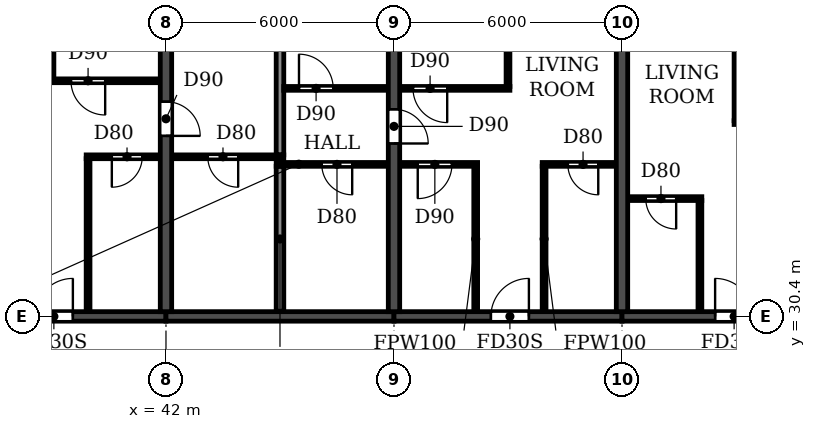
"""IFC4 building model, lengths in metres.
Left out: names, types, materials, properties, quantities, classifications, styles, units other than length and angle.
Written with IfcOpenShell. Run it as: python <this file> out.ifc"""

import sys

from ifc_helpers import new_model, si_unit, direction, frame, frame_2d, origin, place, context, subcontext, project, spatial, rectangle, extrude, element, fill, save


model = new_model("IFC4")
c1 = context("Model", 3, precision=1e-05, world=origin(), true_north=direction((0.0, 1.0)))
c2 = subcontext(c1, "Body", "Model", "MODEL_VIEW")
j1 = project(units=[si_unit("LENGTHUNIT", "METRE"), si_unit("PLANEANGLEUNIT", "RADIAN")], contexts=[c1])
p1 = place(None, origin())
s1 = spatial("IfcSite", under=j1, at=p1, CompositionType="ELEMENT")
p2 = place(p1, origin())
s2 = spatial("IfcBuilding", under=s1, at=p2, CompositionType="ELEMENT")
p3 = place(p2, frame((0.0, 0.0, 142.2)))
s3 = spatial("IfcBuildingStorey", under=s2, at=p3, CompositionType="ELEMENT", Elevation=142.2)
p4 = place(p3, frame((42.0, 30.525, 0.0), z_axis=(0.0, 0.0, 1.0), x_axis=(0.0, 1.0, 0.0)))
e1 = element("IfcWall", 1, at=p4, inside=s3, PredefinedType="SHEAR", context=c2, shape_type="SweptSolid", body=[
    extrude(rectangle(XDim=11.675, YDim=0.3, at=frame_2d((5.837, 0.0))), origin(), (0.0, 0.0, 1.0), 3.07),
])
p5 = place(p4, frame((4.625, 0.0, 0.0)))
e2 = element("IfcOpeningElement", 2, at=p5, cuts=e1, PredefinedType="OPENING", context=c2, shape_type="SweptSolid", body=[
    extrude(rectangle(XDim=0.9, YDim=2.1, at=frame_2d((0.45, 1.05))), frame((0.0, 0.16, 0.0), z_axis=(0.0, -1.0, 0.0), x_axis=(1.0, 0.0, 0.0)), (0.0, 0.0, 1.0), 0.32),
])
p6 = place(p3, frame((48.0, 30.525, 0.0), z_axis=(0.0, 0.0, 1.0), x_axis=(0.0, 1.0, 0.0)))
e3 = element("IfcWall", 3, at=p6, inside=s3, PredefinedType="SHEAR", context=c2, shape_type="SweptSolid", body=[
    extrude(rectangle(XDim=11.675, YDim=0.3, at=frame_2d((5.837, 0.0))), origin(), (0.0, 0.0, 1.0), 3.07),
])
p7 = place(p6, frame((4.425, 0.0, 0.0)))
e4 = element("IfcOpeningElement", 4, at=p7, cuts=e3, PredefinedType="OPENING", context=c2, shape_type="SweptSolid", body=[
    extrude(rectangle(XDim=0.9, YDim=2.1, at=frame_2d((0.45, 1.05))), frame((0.0, 0.16, 0.0), z_axis=(0.0, -1.0, 0.0), x_axis=(1.0, 0.0, 0.0)), (0.0, 0.0, 1.0), 0.32),
])
p8 = place(p3, frame((54.0, 30.525, 0.0), z_axis=(0.0, 0.0, 1.0), x_axis=(0.0, 1.0, 0.0)))
e5 = element("IfcWall", 5, at=p8, inside=s3, PredefinedType="SHEAR", context=c2, shape_type="SweptSolid", body=[
    extrude(rectangle(XDim=11.675, YDim=0.3, at=frame_2d((5.837, 0.0))), origin(), (0.0, 0.0, 1.0), 3.07),
])
p9 = place(p3, frame((36.0, 30.4, 0.0), z_axis=(0.0, 0.0, 1.0), x_axis=(1.0, 0.0, 0.0)))
e6 = element("IfcWall", 6, at=p9, inside=s3, PredefinedType="SHEAR", context=c2, shape_type="SweptSolid", body=[
    extrude(rectangle(XDim=6.0, YDim=0.25, at=frame_2d((3.0, 0.0))), origin(), (0.0, 0.0, 1.0), 2.47),
])
p10 = place(p9, frame((2.55, 0.0, 0.0)))
e7 = element("IfcOpeningElement", 7, at=p10, cuts=e6, PredefinedType="OPENING", context=c2, shape_type="SweptSolid", body=[
    extrude(rectangle(XDim=1.0, YDim=2.1, at=frame_2d((0.5, 1.05))), frame((0.0, 0.135, 0.0), z_axis=(0.0, -1.0, 0.0), x_axis=(1.0, 0.0, 0.0)), (0.0, 0.0, 1.0), 0.27),
])
p11 = place(p3, frame((42.0, 30.4, 0.0), z_axis=(0.0, 0.0, 1.0), x_axis=(1.0, 0.0, 0.0)))
e8 = element("IfcWall", 8, at=p11, inside=s3, PredefinedType="SHEAR", context=c2, shape_type="SweptSolid", body=[
    extrude(rectangle(XDim=6.0, YDim=0.25, at=frame_2d((3.0, 0.0))), origin(), (0.0, 0.0, 1.0), 2.47),
])
p12 = place(p3, frame((48.0, 30.4, 0.0), z_axis=(0.0, 0.0, 1.0), x_axis=(1.0, 0.0, 0.0)))
e9 = element("IfcWall", 9, at=p12, inside=s3, PredefinedType="SHEAR", context=c2, shape_type="SweptSolid", body=[
    extrude(rectangle(XDim=6.0, YDim=0.25, at=frame_2d((3.0, 0.0))), origin(), (0.0, 0.0, 1.0), 2.47),
])
p13 = place(p12, frame((2.55, 0.0, 0.0)))
e10 = element("IfcOpeningElement", 10, at=p13, cuts=e9, PredefinedType="OPENING", context=c2, shape_type="SweptSolid", body=[
    extrude(rectangle(XDim=1.0, YDim=2.1, at=frame_2d((0.5, 1.05))), frame((0.0, 0.135, 0.0), z_axis=(0.0, -1.0, 0.0), x_axis=(1.0, 0.0, 0.0)), (0.0, 0.0, 1.0), 0.27),
])
p14 = place(p3, frame((54.0, 30.4, 0.0), z_axis=(0.0, 0.0, 1.0), x_axis=(1.0, 0.0, 0.0)))
e11 = element("IfcWall", 11, at=p14, inside=s3, PredefinedType="SHEAR", context=c2, shape_type="SweptSolid", body=[
    extrude(rectangle(XDim=6.0, YDim=0.25, at=frame_2d((3.0, 0.0))), origin(), (0.0, 0.0, 1.0), 2.47),
])
p15 = place(p14, frame((2.45, 0.0, 0.0)))
e12 = element("IfcOpeningElement", 12, at=p15, cuts=e11, PredefinedType="OPENING", context=c2, shape_type="SweptSolid", body=[
    extrude(rectangle(XDim=1.0, YDim=2.1, at=frame_2d((0.5, 1.05))), frame((0.0, 0.135, 0.0), z_axis=(0.0, -1.0, 0.0), x_axis=(1.0, 0.0, 0.0)), (0.0, 0.0, 1.0), 0.27),
])
p16 = place(p3, frame((45.0, 30.535, 0.0), z_axis=(0.0, 0.0, 1.0), x_axis=(0.0, 1.0, 0.0)))
e13 = element("IfcWall", 13, at=p16, inside=s3, PredefinedType="PARTITIONING", context=c2, shape_type="SweptSolid", body=[
    extrude(rectangle(XDim=3.815, YDim=0.2, at=frame_2d((1.908, 0.0))), origin(), (0.0, 0.0, 1.0), 3.07),
])
p17 = place(p3, frame((45.0, 34.65, 0.0), z_axis=(0.0, 0.0, 1.0), x_axis=(0.0, 1.0, 0.0)))
e14 = element("IfcWall", 14, at=p17, inside=s3, PredefinedType="PARTITIONING", context=c2, shape_type="SweptSolid", body=[
    extrude(rectangle(XDim=7.69, YDim=0.2, at=frame_2d((3.845, 0.0))), origin(), (0.0, 0.0, 1.0), 3.07),
])
p18 = place(p3, frame((54.16, 33.5, 0.0), z_axis=(0.0, 0.0, 1.0), x_axis=(1.0, 0.0, 0.0)))
e15 = element("IfcWall", 15, at=p18, inside=s3, PredefinedType="PARTITIONING", context=c2, shape_type="SweptSolid", body=[
    extrude(rectangle(XDim=1.94, YDim=0.1, at=frame_2d((0.97, 0.0))), origin(), (0.0, 0.0, 1.0), 3.07),
])
p19 = place(p18, frame((0.465, 0.0, 0.0)))
e16 = element("IfcOpeningElement", 16, at=p19, cuts=e15, PredefinedType="OPENING", context=c2, shape_type="SweptSolid", body=[
    extrude(rectangle(XDim=0.8, YDim=2.1, at=frame_2d((0.4, 1.05))), frame((0.0, 0.06, 0.0), z_axis=(0.0, -1.0, 0.0), x_axis=(1.0, 0.0, 0.0)), (0.0, 0.0, 1.0), 0.12),
])
p20 = place(p3, frame((44.9, 34.4, 0.0), z_axis=(0.0, 0.0, 1.0), x_axis=(1.0, 0.0, 0.0)))
e17 = element("IfcWall", 17, at=p20, inside=s3, PredefinedType="PARTITIONING", context=c2, shape_type="SweptSolid", body=[
    extrude(rectangle(XDim=2.94, YDim=0.1, at=frame_2d((1.47, 0.0))), origin(), (0.0, 0.0, 1.0), 3.07),
])
p21 = place(p20, frame((1.2, 0.0, 0.0)))
e18 = element("IfcOpeningElement", 18, at=p21, cuts=e17, PredefinedType="OPENING", context=c2, shape_type="SweptSolid", body=[
    extrude(rectangle(XDim=0.8, YDim=2.1, at=frame_2d((0.4, 1.05))), frame((0.0, 0.06, 0.0), z_axis=(0.0, -1.0, 0.0), x_axis=(1.0, 0.0, 0.0)), (0.0, 0.0, 1.0), 0.12),
])
p22 = place(p3, frame((48.16, 34.4, 0.0), z_axis=(0.0, 0.0, 1.0), x_axis=(1.0, 0.0, 0.0)))
e19 = element("IfcWall", 19, at=p22, inside=s3, PredefinedType="PARTITIONING", context=c2, shape_type="SweptSolid", body=[
    extrude(rectangle(XDim=2.04, YDim=0.1, at=frame_2d((1.02, 0.0))), origin(), (0.0, 0.0, 1.0), 3.07),
])
p23 = place(p22, frame((0.465, 0.0, 0.0)))
e20 = element("IfcOpeningElement", 20, at=p23, cuts=e19, PredefinedType="OPENING", context=c2, shape_type="SweptSolid", body=[
    extrude(rectangle(XDim=0.9, YDim=2.1, at=frame_2d((0.45, 1.05))), frame((0.0, 0.06, 0.0), z_axis=(0.0, -1.0, 0.0), x_axis=(1.0, 0.0, 0.0)), (0.0, 0.0, 1.0), 0.12),
])
p24 = place(p3, frame((51.9, 34.4, 0.0), z_axis=(0.0, 0.0, 1.0), x_axis=(1.0, 0.0, 0.0)))
e21 = element("IfcWall", 21, at=p24, inside=s3, PredefinedType="PARTITIONING", context=c2, shape_type="SweptSolid", body=[
    extrude(rectangle(XDim=1.94, YDim=0.1, at=frame_2d((0.97, 0.0))), origin(), (0.0, 0.0, 1.0), 3.07),
])
p25 = place(p24, frame((0.675, 0.0, 0.0)))
e22 = element("IfcOpeningElement", 22, at=p25, cuts=e21, PredefinedType="OPENING", context=c2, shape_type="SweptSolid", body=[
    extrude(rectangle(XDim=0.8, YDim=2.1, at=frame_2d((0.4, 1.05))), frame((0.0, 0.06, 0.0), z_axis=(0.0, -1.0, 0.0), x_axis=(1.0, 0.0, 0.0)), (0.0, 0.0, 1.0), 0.12),
])
p26 = place(p3, frame((39.9, 34.6, 0.0), z_axis=(0.0, 0.0, 1.0), x_axis=(1.0, 0.0, 0.0)))
e23 = element("IfcWall", 23, at=p26, inside=s3, PredefinedType="PARTITIONING", context=c2, shape_type="SweptSolid", body=[
    extrude(rectangle(XDim=1.94, YDim=0.1, at=frame_2d((0.97, 0.0))), origin(), (0.0, 0.0, 1.0), 3.07),
])
p27 = place(p26, frame((0.675, 0.0, 0.0)))
e24 = element("IfcOpeningElement", 24, at=p27, cuts=e23, PredefinedType="OPENING", context=c2, shape_type="SweptSolid", body=[
    extrude(rectangle(XDim=0.8, YDim=2.1, at=frame_2d((0.4, 1.05))), frame((0.0, 0.06, 0.0), z_axis=(0.0, -1.0, 0.0), x_axis=(1.0, 0.0, 0.0)), (0.0, 0.0, 1.0), 0.12),
])
p28 = place(p3, frame((42.16, 34.6, 0.0), z_axis=(0.0, 0.0, 1.0), x_axis=(1.0, 0.0, 0.0)))
e25 = element("IfcWall", 25, at=p28, inside=s3, PredefinedType="PARTITIONING", context=c2, shape_type="SweptSolid", body=[
    extrude(rectangle(XDim=2.94, YDim=0.1, at=frame_2d((1.47, 0.0))), origin(), (0.0, 0.0, 1.0), 3.07),
])
p29 = place(p28, frame((0.94, 0.0, 0.0)))
e26 = element("IfcOpeningElement", 26, at=p29, cuts=e25, PredefinedType="OPENING", context=c2, shape_type="SweptSolid", body=[
    extrude(rectangle(XDim=0.8, YDim=2.1, at=frame_2d((0.4, 1.05))), frame((0.0, 0.06, 0.0), z_axis=(0.0, -1.0, 0.0), x_axis=(1.0, 0.0, 0.0)), (0.0, 0.0, 1.0), 0.12),
])
p30 = place(p3, frame((56.95, 35.5, 0.0), z_axis=(0.0, 0.0, 1.0), x_axis=(1.0, 0.0, 0.0)))
e27 = element("IfcWall", 27, at=p30, inside=s3, PredefinedType="PARTITIONING", context=c2, shape_type="SweptSolid", body=[
    extrude(rectangle(XDim=2.89, YDim=0.1, at=frame_2d((1.445, 0.0))), origin(), (0.0, 0.0, 1.0), 3.07),
])
p31 = place(p30, frame((0.55, 0.0, 0.0)))
e28 = element("IfcOpeningElement", 28, at=p31, cuts=e27, PredefinedType="OPENING", context=c2, shape_type="SweptSolid", body=[
    extrude(rectangle(XDim=0.9, YDim=2.1, at=frame_2d((0.45, 1.05))), frame((0.0, 0.06, 0.0), z_axis=(0.0, -1.0, 0.0), x_axis=(1.0, 0.0, 0.0)), (0.0, 0.0, 1.0), 0.12),
])
p32 = place(p3, frame((45.1, 36.4, 0.0), z_axis=(0.0, 0.0, 1.0), x_axis=(1.0, 0.0, 0.0)))
e29 = element("IfcWall", 29, at=p32, inside=s3, PredefinedType="PARTITIONING", context=c2, shape_type="SweptSolid", body=[
    extrude(rectangle(XDim=2.74, YDim=0.1, at=frame_2d((1.37, 0.0))), origin(), (0.0, 0.0, 1.0), 3.07),
])
p33 = place(p32, frame((0.4, 0.0, 0.0)))
e30 = element("IfcOpeningElement", 30, at=p33, cuts=e29, PredefinedType="OPENING", context=c2, shape_type="SweptSolid", body=[
    extrude(rectangle(XDim=0.9, YDim=2.1, at=frame_2d((0.45, 1.05))), frame((0.0, 0.06, 0.0), z_axis=(0.0, -1.0, 0.0), x_axis=(1.0, 0.0, 0.0)), (0.0, 0.0, 1.0), 0.12),
])
p34 = place(p3, frame((48.16, 36.4, 0.0), z_axis=(0.0, 0.0, 1.0), x_axis=(1.0, 0.0, 0.0)))
e31 = element("IfcWall", 31, at=p34, inside=s3, PredefinedType="PARTITIONING", context=c2, shape_type="SweptSolid", body=[
    extrude(rectangle(XDim=2.89, YDim=0.1, at=frame_2d((1.445, 0.0))), origin(), (0.0, 0.0, 1.0), 3.07),
])
p35 = place(p34, frame((0.34, 0.0, 0.0)))
e32 = element("IfcOpeningElement", 32, at=p35, cuts=e31, PredefinedType="OPENING", context=c2, shape_type="SweptSolid", body=[
    extrude(rectangle(XDim=0.9, YDim=2.1, at=frame_2d((0.45, 1.05))), frame((0.0, 0.06, 0.0), z_axis=(0.0, -1.0, 0.0), x_axis=(1.0, 0.0, 0.0)), (0.0, 0.0, 1.0), 0.12),
])
p36 = place(p3, frame((38.95, 36.6, 0.0), z_axis=(0.0, 0.0, 1.0), x_axis=(1.0, 0.0, 0.0)))
e33 = element("IfcWall", 33, at=p36, inside=s3, PredefinedType="PARTITIONING", context=c2, shape_type="SweptSolid", body=[
    extrude(rectangle(XDim=2.89, YDim=0.1, at=frame_2d((1.445, 0.0))), origin(), (0.0, 0.0, 1.0), 3.07),
])
p37 = place(p36, frame((0.55, 0.0, 0.0)))
e34 = element("IfcOpeningElement", 34, at=p37, cuts=e33, PredefinedType="OPENING", context=c2, shape_type="SweptSolid", body=[
    extrude(rectangle(XDim=0.9, YDim=2.1, at=frame_2d((0.45, 1.05))), frame((0.0, 0.06, 0.0), z_axis=(0.0, -1.0, 0.0), x_axis=(1.0, 0.0, 0.0)), (0.0, 0.0, 1.0), 0.12),
])
p38 = place(p3, frame((39.0, 36.65, 0.0), z_axis=(0.0, 0.0, 1.0), x_axis=(0.0, 1.0, 0.0)))
e35 = element("IfcWall", 35, at=p38, inside=s3, PredefinedType="PARTITIONING", context=c2, shape_type="SweptSolid", body=[
    extrude(rectangle(XDim=5.69, YDim=0.1, at=frame_2d((2.845, 0.0))), origin(), (0.0, 0.0, 1.0), 3.07),
])
p39 = place(p3, frame((39.95, 30.535, 0.0), z_axis=(0.0, 0.0, 1.0), x_axis=(0.0, 1.0, 0.0)))
e36 = element("IfcWall", 36, at=p39, inside=s3, PredefinedType="PARTITIONING", context=c2, shape_type="SweptSolid", body=[
    extrude(rectangle(XDim=4.015, YDim=0.1, at=frame_2d((2.008, 0.0))), origin(), (0.0, 0.0, 1.0), 3.07),
])
p40 = place(p3, frame((50.15, 30.535, 0.0), z_axis=(0.0, 0.0, 1.0), x_axis=(0.0, 1.0, 0.0)))
e37 = element("IfcWall", 37, at=p40, inside=s3, PredefinedType="PARTITIONING", context=c2, shape_type="SweptSolid", body=[
    extrude(rectangle(XDim=3.815, YDim=0.1, at=frame_2d((1.908, 0.0))), origin(), (0.0, 0.0, 1.0), 3.07),
])
p41 = place(p3, frame((51.0, 36.45, 0.0), z_axis=(0.0, 0.0, 1.0), x_axis=(0.0, 1.0, 0.0)))
e38 = element("IfcWall", 38, at=p41, inside=s3, PredefinedType="PARTITIONING", context=c2, shape_type="SweptSolid", body=[
    extrude(rectangle(XDim=5.89, YDim=0.1, at=frame_2d((2.945, 0.0))), origin(), (0.0, 0.0, 1.0), 3.07),
])
p42 = place(p3, frame((51.95, 30.535, 0.0), z_axis=(0.0, 0.0, 1.0), x_axis=(0.0, 1.0, 0.0)))
e39 = element("IfcWall", 39, at=p42, inside=s3, PredefinedType="PARTITIONING", context=c2, shape_type="SweptSolid", body=[
    extrude(rectangle(XDim=3.815, YDim=0.1, at=frame_2d((1.908, 0.0))), origin(), (0.0, 0.0, 1.0), 3.07),
])
p43 = place(p3, frame((56.05, 30.535, 0.0), z_axis=(0.0, 0.0, 1.0), x_axis=(0.0, 1.0, 0.0)))
e40 = element("IfcWall", 40, at=p43, inside=s3, PredefinedType="PARTITIONING", context=c2, shape_type="SweptSolid", body=[
    extrude(rectangle(XDim=2.915, YDim=0.1, at=frame_2d((1.458, 0.0))), origin(), (0.0, 0.0, 1.0), 3.07),
])
p44 = place(p3, frame((57.0, 35.55, 0.0), z_axis=(0.0, 0.0, 1.0), x_axis=(0.0, 1.0, 0.0)))
e41 = element("IfcWall", 41, at=p44, inside=s3, PredefinedType="PARTITIONING", context=c2, shape_type="SweptSolid", body=[
    extrude(rectangle(XDim=6.79, YDim=0.1, at=frame_2d((3.395, 0.0))), origin(), (0.0, 0.0, 1.0), 3.07),
])
p45 = place(p29, frame((0.8, 0.0, 0.0), z_axis=(0.0, 0.0, 1.0), x_axis=(-1.0, 0.0, 0.0)))
e42 = element("IfcDoor", 42, at=p45, inside=s3, OperationType="SINGLE_SWING_LEFT", PredefinedType="DOOR", context=c2, shape_type="SweptSolid", body=[
    extrude(rectangle(XDim=0.8, YDim=2.1, at=frame_2d((0.4, 1.05))), frame((0.0, 0.025, 0.0), z_axis=(0.0, -1.0, 0.0), x_axis=(1.0, 0.0, 0.0)), (0.0, 0.0, 1.0), 0.05),
])
fill(e26, e42)
p46 = place(p10, origin())
e43 = element("IfcDoor", 43, at=p46, inside=s3, OperationType="SINGLE_SWING_RIGHT", PredefinedType="DOOR", context=c2, shape_type="SweptSolid", body=[
    extrude(rectangle(XDim=1.0, YDim=2.1, at=frame_2d((0.5, 1.05))), frame((0.0, 0.025, 0.0), z_axis=(0.0, -1.0, 0.0), x_axis=(1.0, 0.0, 0.0)), (0.0, 0.0, 1.0), 0.05),
])
fill(e7, e43)
p47 = place(p37, frame((0.9, 0.0, 0.0), z_axis=(0.0, 0.0, 1.0), x_axis=(-1.0, 0.0, 0.0)))
e44 = element("IfcDoor", 44, at=p47, inside=s3, OperationType="SINGLE_SWING_LEFT", PredefinedType="DOOR", context=c2, shape_type="SweptSolid", body=[
    extrude(rectangle(XDim=0.9, YDim=2.1, at=frame_2d((0.45, 1.05))), frame((0.0, 0.025, 0.0), z_axis=(0.0, -1.0, 0.0), x_axis=(1.0, 0.0, 0.0)), (0.0, 0.0, 1.0), 0.05),
])
fill(e34, e44)
p48 = place(p27, frame((0.8, 0.0, 0.0), z_axis=(0.0, 0.0, 1.0), x_axis=(-1.0, 0.0, 0.0)))
e45 = element("IfcDoor", 45, at=p48, inside=s3, OperationType="SINGLE_SWING_RIGHT", PredefinedType="DOOR", context=c2, shape_type="SweptSolid", body=[
    extrude(rectangle(XDim=0.8, YDim=2.1, at=frame_2d((0.4, 1.05))), frame((0.0, 0.025, 0.0), z_axis=(0.0, -1.0, 0.0), x_axis=(1.0, 0.0, 0.0)), (0.0, 0.0, 1.0), 0.05),
])
fill(e24, e45)
p49 = place(p5, frame((0.9, 0.0, 0.0), z_axis=(0.0, 0.0, 1.0), x_axis=(-1.0, 0.0, 0.0)))
e46 = element("IfcDoor", 46, at=p49, inside=s3, OperationType="SINGLE_SWING_RIGHT", PredefinedType="DOOR", context=c2, shape_type="SweptSolid", body=[
    extrude(rectangle(XDim=0.9, YDim=2.1, at=frame_2d((0.45, 1.05))), frame((0.0, 0.025, 0.0), z_axis=(0.0, -1.0, 0.0), x_axis=(1.0, 0.0, 0.0)), (0.0, 0.0, 1.0), 0.05),
])
fill(e2, e46)
p50 = place(p33, origin())
e47 = element("IfcDoor", 47, at=p50, inside=s3, OperationType="SINGLE_SWING_LEFT", PredefinedType="DOOR", context=c2, shape_type="SweptSolid", body=[
    extrude(rectangle(XDim=0.9, YDim=2.1, at=frame_2d((0.45, 1.05))), frame((0.0, 0.025, 0.0), z_axis=(0.0, -1.0, 0.0), x_axis=(1.0, 0.0, 0.0)), (0.0, 0.0, 1.0), 0.05),
])
fill(e30, e47)
p51 = place(p21, frame((0.8, 0.0, 0.0), z_axis=(0.0, 0.0, 1.0), x_axis=(-1.0, 0.0, 0.0)))
e48 = element("IfcDoor", 48, at=p51, inside=s3, OperationType="SINGLE_SWING_LEFT", PredefinedType="DOOR", context=c2, shape_type="SweptSolid", body=[
    extrude(rectangle(XDim=0.8, YDim=2.1, at=frame_2d((0.4, 1.05))), frame((0.0, 0.025, 0.0), z_axis=(0.0, -1.0, 0.0), x_axis=(1.0, 0.0, 0.0)), (0.0, 0.0, 1.0), 0.05),
])
fill(e18, e48)
p52 = place(p7, frame((0.9, 0.0, 0.0), z_axis=(0.0, 0.0, 1.0), x_axis=(-1.0, 0.0, 0.0)))
e49 = element("IfcDoor", 49, at=p52, inside=s3, OperationType="SINGLE_SWING_RIGHT", PredefinedType="DOOR", context=c2, shape_type="SweptSolid", body=[
    extrude(rectangle(XDim=0.9, YDim=2.1, at=frame_2d((0.45, 1.05))), frame((0.0, 0.025, 0.0), z_axis=(0.0, -1.0, 0.0), x_axis=(1.0, 0.0, 0.0)), (0.0, 0.0, 1.0), 0.05),
])
fill(e4, e49)
p53 = place(p35, frame((0.9, 0.0, 0.0), z_axis=(0.0, 0.0, 1.0), x_axis=(-1.0, 0.0, 0.0)))
e50 = element("IfcDoor", 50, at=p53, inside=s3, OperationType="SINGLE_SWING_LEFT", PredefinedType="DOOR", context=c2, shape_type="SweptSolid", body=[
    extrude(rectangle(XDim=0.9, YDim=2.1, at=frame_2d((0.45, 1.05))), frame((0.0, 0.025, 0.0), z_axis=(0.0, -1.0, 0.0), x_axis=(1.0, 0.0, 0.0)), (0.0, 0.0, 1.0), 0.05),
])
fill(e32, e50)
p54 = place(p23, frame((0.9, 0.0, 0.0), z_axis=(0.0, 0.0, 1.0), x_axis=(-1.0, 0.0, 0.0)))
e51 = element("IfcDoor", 51, at=p54, inside=s3, OperationType="SINGLE_SWING_RIGHT", PredefinedType="DOOR", context=c2, shape_type="SweptSolid", body=[
    extrude(rectangle(XDim=0.9, YDim=2.1, at=frame_2d((0.45, 1.05))), frame((0.0, 0.025, 0.0), z_axis=(0.0, -1.0, 0.0), x_axis=(1.0, 0.0, 0.0)), (0.0, 0.0, 1.0), 0.05),
])
fill(e20, e51)
p55 = place(p13, origin())
e52 = element("IfcDoor", 52, at=p55, inside=s3, OperationType="SINGLE_SWING_RIGHT", PredefinedType="DOOR", context=c2, shape_type="SweptSolid", body=[
    extrude(rectangle(XDim=1.0, YDim=2.1, at=frame_2d((0.5, 1.05))), frame((0.0, 0.025, 0.0), z_axis=(0.0, -1.0, 0.0), x_axis=(1.0, 0.0, 0.0)), (0.0, 0.0, 1.0), 0.05),
])
fill(e10, e52)
p56 = place(p25, frame((0.8, 0.0, 0.0), z_axis=(0.0, 0.0, 1.0), x_axis=(-1.0, 0.0, 0.0)))
e53 = element("IfcDoor", 53, at=p56, inside=s3, OperationType="SINGLE_SWING_LEFT", PredefinedType="DOOR", context=c2, shape_type="SweptSolid", body=[
    extrude(rectangle(XDim=0.8, YDim=2.1, at=frame_2d((0.4, 1.05))), frame((0.0, 0.025, 0.0), z_axis=(0.0, -1.0, 0.0), x_axis=(1.0, 0.0, 0.0)), (0.0, 0.0, 1.0), 0.05),
])
fill(e22, e53)
p57 = place(p19, frame((0.8, 0.0, 0.0), z_axis=(0.0, 0.0, 1.0), x_axis=(-1.0, 0.0, 0.0)))
e54 = element("IfcDoor", 54, at=p57, inside=s3, OperationType="SINGLE_SWING_LEFT", PredefinedType="DOOR", context=c2, shape_type="SweptSolid", body=[
    extrude(rectangle(XDim=0.8, YDim=2.1, at=frame_2d((0.4, 1.05))), frame((0.0, 0.025, 0.0), z_axis=(0.0, -1.0, 0.0), x_axis=(1.0, 0.0, 0.0)), (0.0, 0.0, 1.0), 0.05),
])
fill(e16, e54)
p58 = place(p15, origin())
e55 = element("IfcDoor", 55, at=p58, inside=s3, OperationType="SINGLE_SWING_LEFT", PredefinedType="DOOR", context=c2, shape_type="SweptSolid", body=[
    extrude(rectangle(XDim=1.0, YDim=2.1, at=frame_2d((0.5, 1.05))), frame((0.0, 0.025, 0.0), z_axis=(0.0, -1.0, 0.0), x_axis=(1.0, 0.0, 0.0)), (0.0, 0.0, 1.0), 0.05),
])
fill(e12, e55)
save(model, sys.argv[1])
